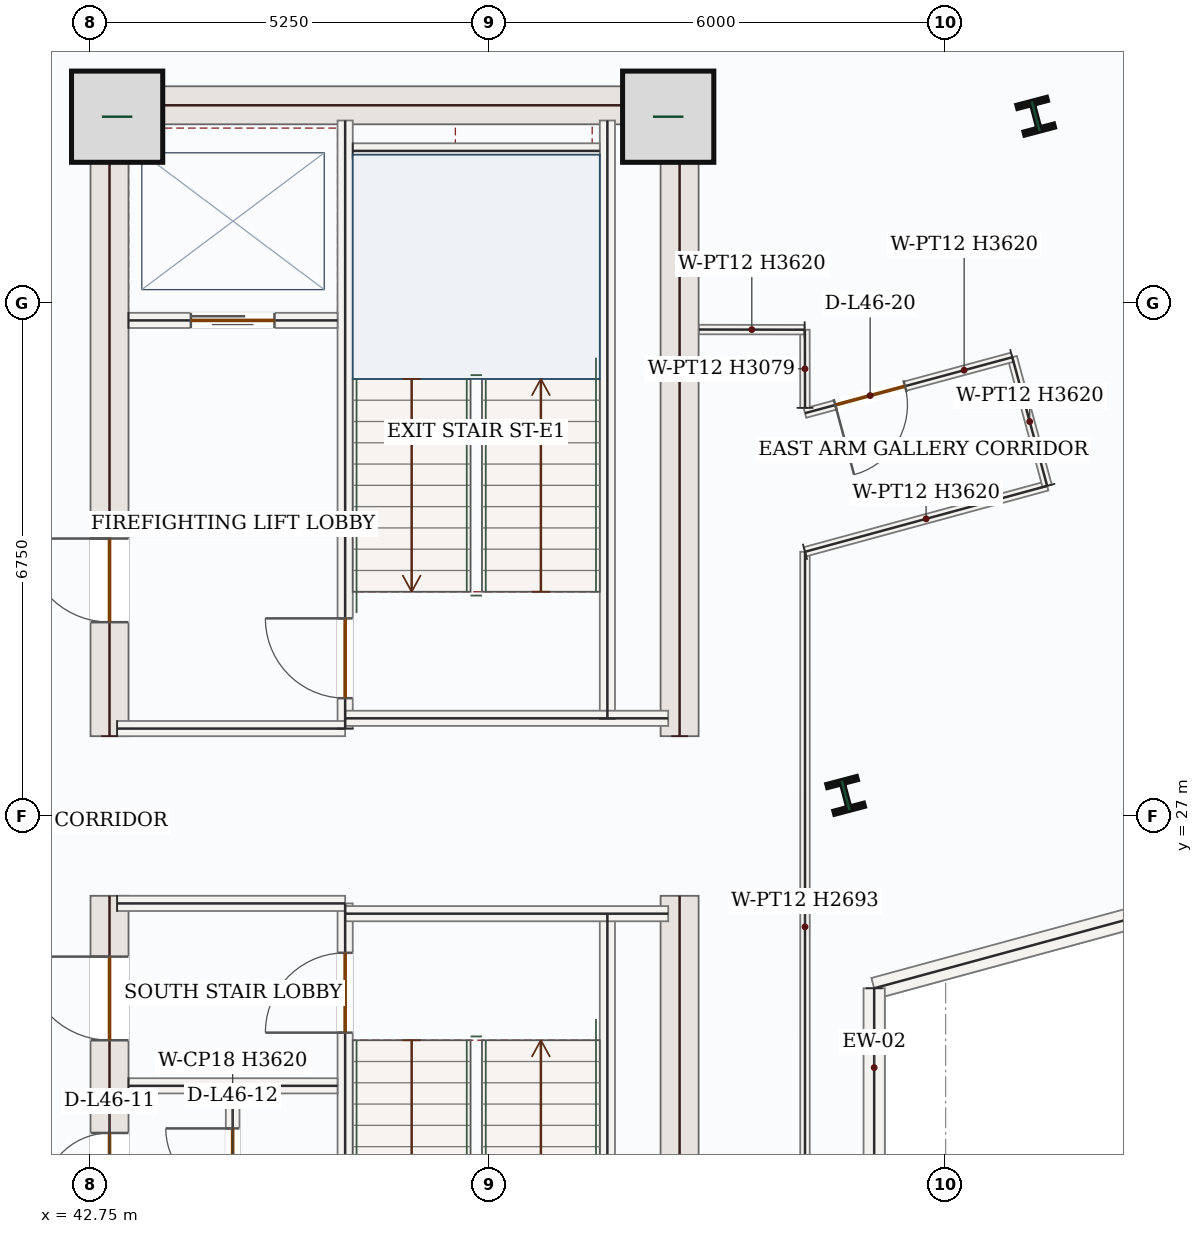
"""IFC4 building model, lengths in metres.
Left out: names, types, materials, properties, quantities, classifications, styles, units other than length and angle.
Written with IfcOpenShell. Run it as: python <this file> out.ifc"""

import sys

from ifc_helpers import new_model, si_unit, direction, frame, frame_2d, origin, origin_2d, place, context, subcontext, project, spatial, rectangle, i_section, extrude, source, transform, mapped, element, fill, save


model = new_model("IFC4")
c1 = context("Model", 3, precision=1e-05, world=origin(), true_north=direction((0.0, 1.0)))
c2 = subcontext(c1, "Body", "Model", "MODEL_VIEW")
j1 = project(units=[si_unit("LENGTHUNIT", "METRE"), si_unit("PLANEANGLEUNIT", "RADIAN")], contexts=[c1])
p1 = place(None, origin())
s1 = spatial("IfcSite", under=j1, at=p1, CompositionType="ELEMENT")
p2 = place(p1, origin())
s2 = spatial("IfcBuilding", under=s1, at=p2, CompositionType="ELEMENT")
p3 = place(p2, frame((0.0, 0.0, 198.0)))
s3 = spatial("IfcBuildingStorey", under=s2, at=p3, CompositionType="ELEMENT", Elevation=198.0)
p4 = place(p3, frame((43.0, 17.4, 0.0), z_axis=(0.0, 0.0, 1.0), x_axis=(0.0, 1.0, 0.0)))
e1 = element("IfcWall", 1, at=p4, inside=s3, PredefinedType="SHEAR", context=c2, shape_type="SweptSolid", body=[
    extrude(rectangle(XDim=8.55, YDim=0.5, at=frame_2d((4.275, 0.0))), origin(), (0.0, 0.0, 1.0), 3.62),
])
p5 = place(p4, frame((6.65, 0.0, 0.0)))
e2 = element("IfcOpeningElement", 2, at=p5, cuts=e1, PredefinedType="OPENING", context=c2, shape_type="SweptSolid", body=[
    extrude(rectangle(XDim=1.1, YDim=2.2, at=frame_2d((0.55, 1.1))), frame((0.0, 0.26, 0.0), z_axis=(0.0, -1.0, 0.0), x_axis=(1.0, 0.0, 0.0)), (0.0, 0.0, 1.0), 0.52),
])
p6 = place(p4, frame((1.75, 0.0, 0.0)))
e3 = element("IfcOpeningElement", 3, at=p6, cuts=e1, PredefinedType="OPENING", context=c2, shape_type="SweptSolid", body=[
    extrude(rectangle(XDim=1.3, YDim=2.2, at=frame_2d((0.65, 1.1))), frame((0.0, 0.26, 0.0), z_axis=(0.0, -1.0, 0.0), x_axis=(1.0, 0.0, 0.0)), (0.0, 0.0, 1.0), 0.52),
])
p7 = place(p4, frame((4.55, 0.0, 0.0)))
e4 = element("IfcOpeningElement", 4, at=p7, cuts=e1, PredefinedType="OPENING", context=c2, shape_type="SweptSolid", body=[
    extrude(rectangle(XDim=0.88, YDim=2.1, at=frame_2d((0.44, 1.05))), frame((0.0, 0.26, 0.0), z_axis=(0.0, -1.0, 0.0), x_axis=(1.0, 0.0, 0.0)), (0.0, 0.0, 1.0), 0.52),
])
p8 = place(p3, frame((43.0, 28.05, 0.0), z_axis=(0.0, 0.0, 1.0), x_axis=(0.0, 1.0, 0.0)))
e5 = element("IfcWall", 5, at=p8, inside=s3, PredefinedType="SHEAR", context=c2, shape_type="SweptSolid", body=[
    extrude(rectangle(XDim=8.55, YDim=0.5, at=frame_2d((4.275, 0.0))), origin(), (0.0, 0.0, 1.0), 3.62),
])
p9 = place(p8, frame((1.5, 0.0, 0.0)))
e6 = element("IfcOpeningElement", 6, at=p9, cuts=e5, PredefinedType="OPENING", context=c2, shape_type="SweptSolid", body=[
    extrude(rectangle(XDim=1.1, YDim=2.2, at=frame_2d((0.55, 1.1))), frame((0.0, 0.26, 0.0), z_axis=(0.0, -1.0, 0.0), x_axis=(1.0, 0.0, 0.0)), (0.0, 0.0, 1.0), 0.52),
])
m1 = source(origin(), c2, "Body", "SweptSolid", [
    extrude(rectangle(XDim=8.55, YDim=0.5, at=frame_2d((4.275, 0.0))), origin(), (0.0, 0.0, 1.0), 3.62),
])
for number, where, z_axis, x_axis in (
    (7, (50.5, 17.4, 0.0), (0.0, 0.0, 1.0), (0.0, 1.0, 0.0)),
    (8, (50.5, 28.05, 0.0), (0.0, 0.0, 1.0), (0.0, 1.0, 0.0)),
):
    element("IfcWall", number, at=place(p3, frame(where, z_axis=z_axis, x_axis=x_axis)), inside=s3, PredefinedType="SHEAR", context=c2, shape_type="MappedRepresentation", body=[
        mapped(m1, transform((0.0, 0.0, 0.0), x_axis=(1.0, 0.0, 0.0), y_axis=(0.0, 1.0, 0.0), z_axis=(0.0, 0.0, 1.0), scale=1.0)),
    ])
m2 = source(origin(), c2, "Body", "SweptSolid", [
    extrude(rectangle(XDim=7.0, YDim=0.5, at=frame_2d((3.5, 0.0))), origin(), (0.0, 0.0, 1.0), 3.62),
])
p10 = place(p3, frame((43.25, 36.35, 0.0), z_axis=(0.0, 0.0, 1.0), x_axis=(1.0, 0.0, 0.0)))
e9 = element("IfcWall", 9, at=p10, inside=s3, PredefinedType="SHEAR", context=c2, shape_type="MappedRepresentation", body=[
    mapped(m2, transform((0.0, 0.0, 0.0), x_axis=(1.0, 0.0, 0.0), y_axis=(0.0, 1.0, 0.0), z_axis=(0.0, 0.0, 1.0), scale=1.0)),
])
m3 = source(origin(), c2, "Body", "SweptSolid", [
    extrude(rectangle(XDim=1.2, YDim=1.2, at=origin_2d()), origin(), (0.0, 0.0, 1.0), 3.9),
])
for number, where, z_axis, x_axis in (
    (10, (43.1, 36.2, 0.0), (0.0, 0.0, 1.0), (1.0, 0.0, 0.0)),
    (11, (50.35, 36.2, 0.0), (0.0, 0.0, 1.0), (1.0, 0.0, 0.0)),
):
    element("IfcColumn", number, at=place(p3, frame(where, z_axis=z_axis, x_axis=x_axis)), inside=s3, PredefinedType="COLUMN", context=c2, shape_type="MappedRepresentation", body=[
        mapped(m3, transform((0.0, 0.0, 0.0), x_axis=(1.0, 0.0, 0.0), y_axis=(0.0, 1.0, 0.0), z_axis=(0.0, 0.0, 1.0), scale=1.0)),
    ])
m4 = source(origin(), c2, "Body", "SweptSolid", [
    extrude(i_section(OverallWidth=0.404, OverallDepth=0.407, WebThickness=0.027, FlangeThickness=0.044, FilletRadius=0.018, at=origin_2d()), origin(), (0.0, 0.0, 1.0), 3.9),
])
for number, where, z_axis, x_axis in (
    (12, (52.684, 27.271, 0.0), (0.0, 0.0, 1.0), (0.967, 0.255, 0.0)),
    (13, (55.185, 36.206, 0.0), (0.0, 0.0, 1.0), (0.967, 0.255, 0.0)),
):
    element("IfcColumn", number, at=place(p3, frame(where, z_axis=z_axis, x_axis=x_axis)), inside=s3, PredefinedType="COLUMN", context=c2, shape_type="MappedRepresentation", body=[
        mapped(m4, transform((0.0, 0.0, 0.0), x_axis=(1.0, 0.0, 0.0), y_axis=(0.0, 1.0, 0.0), z_axis=(0.0, 0.0, 1.0), scale=1.0)),
    ])
p11 = place(p3, frame((62.026, 27.17, 0.0), z_axis=(0.0, 0.0, 1.0), x_axis=(-0.965014433153, -0.262196765439, 0.0)))
e14 = element("IfcWall", 14, at=p11, inside=s3, PredefinedType="SOLIDWALL", context=c2, shape_type="SweptSolid", body=[
    extrude(rectangle(XDim=9.291, YDim=0.28, at=frame_2d((4.646, 0.0))), origin(), (0.0, 0.0, 1.0), 3.62),
])
p12 = place(p11, frame((3.746, 0.0, 0.85)))
e15 = element("IfcOpeningElement", 15, at=p12, cuts=e14, PredefinedType="OPENING", context=c2, shape_type="SweptSolid", body=[
    extrude(rectangle(XDim=1.8, YDim=1.75, at=frame_2d((0.9, 0.875))), frame((0.0, 0.15, 0.0), z_axis=(0.0, -1.0, 0.0), x_axis=(1.0, 0.0, 0.0)), (0.0, 0.0, 1.0), 0.3),
])
p13 = place(p3, frame((53.06, 24.734, 0.0), z_axis=(0.0, 0.0, 1.0), x_axis=(0.0, -1.0, 0.0)))
e16 = element("IfcWall", 16, at=p13, inside=s3, PredefinedType="SOLIDWALL", context=c2, shape_type="SweptSolid", body=[
    extrude(rectangle(XDim=6.276, YDim=0.28, at=frame_2d((3.138, 0.0))), origin(), (0.0, 0.0, 1.0), 3.62),
])
p14 = place(p13, frame((2.238, 0.0, 0.85)))
e17 = element("IfcOpeningElement", 17, at=p14, cuts=e16, PredefinedType="OPENING", context=c2, shape_type="SweptSolid", body=[
    extrude(rectangle(XDim=1.8, YDim=1.75, at=frame_2d((0.9, 0.875))), frame((0.0, 0.15, 0.0), z_axis=(0.0, -1.0, 0.0), x_axis=(1.0, 0.0, 0.0)), (0.0, 0.0, 1.0), 0.3),
])
m5 = source(origin(), c2, "Body", "SweptSolid", [
    extrude(rectangle(XDim=7.87, YDim=0.2, at=frame_2d((3.935, 0.0))), origin(), (0.0, 0.0, 1.0), 3.62),
])
for number, where, z_axis, x_axis in (
    (18, (49.55, 17.85, 0.0), (0.0, 0.0, 1.0), (0.0, 1.0, 0.0)),
    (19, (49.55, 28.28, 0.0), (0.0, 0.0, 1.0), (0.0, 1.0, 0.0)),
):
    element("IfcWall", number, at=place(p3, frame(where, z_axis=z_axis, x_axis=x_axis)), inside=s3, PredefinedType="SOLIDWALL", context=c2, shape_type="MappedRepresentation", body=[
        mapped(m5, transform((0.0, 0.0, 0.0), x_axis=(1.0, 0.0, 0.0), y_axis=(0.0, 1.0, 0.0), z_axis=(0.0, 0.0, 1.0), scale=1.0)),
    ])
p15 = place(p3, frame((46.1, 17.85, 0.0), z_axis=(0.0, 0.0, 1.0), x_axis=(0.0, 1.0, 0.0)))
e20 = element("IfcWall", 20, at=p15, inside=s3, PredefinedType="SOLIDWALL", context=c2, shape_type="SweptSolid", body=[
    extrude(rectangle(XDim=8.0, YDim=0.2, at=frame_2d((4.0, 0.0))), origin(), (0.0, 0.0, 1.0), 3.62),
])
p16 = place(p15, frame((6.3, 0.0, 0.0)))
e21 = element("IfcOpeningElement", 21, at=p16, cuts=e20, PredefinedType="OPENING", context=c2, shape_type="SweptSolid", body=[
    extrude(rectangle(XDim=1.05, YDim=2.15, at=frame_2d((0.525, 1.075))), frame((0.0, 0.11, 0.0), z_axis=(0.0, -1.0, 0.0), x_axis=(1.0, 0.0, 0.0)), (0.0, 0.0, 1.0), 0.22),
])
p17 = place(p3, frame((46.1, 28.15, 0.0), z_axis=(0.0, 0.0, 1.0), x_axis=(0.0, 1.0, 0.0)))
e22 = element("IfcWall", 22, at=p17, inside=s3, PredefinedType="SOLIDWALL", context=c2, shape_type="SweptSolid", body=[
    extrude(rectangle(XDim=8.0, YDim=0.2, at=frame_2d((4.0, 0.0))), origin(), (0.0, 0.0, 1.0), 3.62),
])
p18 = place(p17, frame((0.4, 0.0, 0.0)))
e23 = element("IfcOpeningElement", 23, at=p18, cuts=e22, PredefinedType="OPENING", context=c2, shape_type="SweptSolid", body=[
    extrude(rectangle(XDim=1.05, YDim=2.15, at=frame_2d((0.525, 1.075))), frame((0.0, 0.11, 0.0), z_axis=(0.0, -1.0, 0.0), x_axis=(1.0, 0.0, 0.0)), (0.0, 0.0, 1.0), 0.22),
])
m6 = source(origin(), c2, "Body", "SweptSolid", [
    extrude(rectangle(XDim=3.0, YDim=0.2, at=frame_2d((1.5, 0.0))), origin(), (0.0, 0.0, 1.0), 3.62),
])
p19 = place(p3, frame((43.1, 25.85, 0.0), z_axis=(0.0, 0.0, 1.0), x_axis=(1.0, 0.0, 0.0)))
e24 = element("IfcWall", 24, at=p19, inside=s3, PredefinedType="SOLIDWALL", context=c2, shape_type="MappedRepresentation", body=[
    mapped(m6, transform((0.0, 0.0, 0.0), x_axis=(1.0, 0.0, 0.0), y_axis=(0.0, 1.0, 0.0), z_axis=(0.0, 0.0, 1.0), scale=1.0)),
])
m7 = source(origin(), c2, "Body", "SweptSolid", [
    extrude(rectangle(XDim=4.25, YDim=0.2, at=frame_2d((2.125, 0.0))), origin(), (0.0, 0.0, 1.0), 3.62),
])
p20 = place(p3, frame((46.1, 25.715, 0.0), z_axis=(0.0, 0.0, 1.0), x_axis=(1.0, 0.0, 0.0)))
e25 = element("IfcWall", 25, at=p20, inside=s3, PredefinedType="SOLIDWALL", context=c2, shape_type="MappedRepresentation", body=[
    mapped(m7, transform((0.0, 0.0, 0.0), x_axis=(1.0, 0.0, 0.0), y_axis=(0.0, 1.0, 0.0), z_axis=(0.0, 0.0, 1.0), scale=1.0)),
])
p21 = place(p3, frame((43.1, 28.15, 0.0), z_axis=(0.0, 0.0, 1.0), x_axis=(1.0, 0.0, 0.0)))
e26 = element("IfcWall", 26, at=p21, inside=s3, PredefinedType="SOLIDWALL", context=c2, shape_type="MappedRepresentation", body=[
    mapped(m6, transform((0.0, 0.0, 0.0), x_axis=(1.0, 0.0, 0.0), y_axis=(0.0, 1.0, 0.0), z_axis=(0.0, 0.0, 1.0), scale=1.0)),
])
p22 = place(p3, frame((46.1, 28.285, 0.0), z_axis=(0.0, 0.0, 1.0), x_axis=(1.0, 0.0, 0.0)))
e27 = element("IfcWall", 27, at=p22, inside=s3, PredefinedType="SOLIDWALL", context=c2, shape_type="MappedRepresentation", body=[
    mapped(m7, transform((0.0, 0.0, 0.0), x_axis=(1.0, 0.0, 0.0), y_axis=(0.0, 1.0, 0.0), z_axis=(0.0, 0.0, 1.0), scale=1.0)),
])
m8 = source(origin(), c2, "Body", "SweptSolid", [
    extrude(rectangle(XDim=3.25, YDim=0.2, at=frame_2d((1.625, 0.0))), origin(), (0.0, 0.0, 1.0), 3.62),
])
p23 = place(p3, frame((46.2, 35.75, 0.0), z_axis=(0.0, 0.0, 1.0), x_axis=(1.0, 0.0, 0.0)))
e28 = element("IfcWall", 28, at=p23, inside=s3, PredefinedType="SOLIDWALL", context=c2, shape_type="MappedRepresentation", body=[
    mapped(m8, transform((0.0, 0.0, 0.0), x_axis=(1.0, 0.0, 0.0), y_axis=(0.0, 1.0, 0.0), z_axis=(0.0, 0.0, 1.0), scale=1.0)),
])
p24 = place(p3, frame((43.25, 33.52, 0.0), z_axis=(0.0, 0.0, 1.0), x_axis=(1.0, 0.0, 0.0)))
e29 = element("IfcWall", 29, at=p24, inside=s3, PredefinedType="SOLIDWALL", context=c2, shape_type="SweptSolid", body=[
    extrude(rectangle(XDim=2.75, YDim=0.2, at=frame_2d((1.375, 0.0))), origin(), (0.0, 0.0, 1.0), 3.62),
])
p25 = place(p24, frame((0.82, 0.0, 0.0)))
e30 = element("IfcOpeningElement", 30, at=p25, cuts=e29, PredefinedType="OPENING", context=c2, shape_type="SweptSolid", body=[
    extrude(rectangle(XDim=1.1, YDim=2.15, at=frame_2d((0.55, 1.075))), frame((0.0, 0.11, 0.0), z_axis=(0.0, -1.0, 0.0), x_axis=(1.0, 0.0, 0.0)), (0.0, 0.0, 1.0), 0.22),
])
m9 = source(origin(), c2, "Body", "SweptSolid", [
    extrude(rectangle(XDim=2.75, YDim=0.2, at=frame_2d((1.375, 0.0))), origin(), (0.0, 0.0, 1.0), 3.62),
])
p26 = place(p3, frame((43.25, 23.45, 0.0), z_axis=(0.0, 0.0, 1.0), x_axis=(1.0, 0.0, 0.0)))
e31 = element("IfcWall", 31, at=p26, inside=s3, PredefinedType="SOLIDWALL", context=c2, shape_type="MappedRepresentation", body=[
    mapped(m9, transform((0.0, 0.0, 0.0), x_axis=(1.0, 0.0, 0.0), y_axis=(0.0, 1.0, 0.0), z_axis=(0.0, 0.0, 1.0), scale=1.0)),
])
p27 = place(p3, frame((44.62, 21.55, 0.0), z_axis=(0.0, 0.0, 1.0), x_axis=(0.0, 1.0, 0.0)))
e32 = element("IfcWall", 32, at=p27, inside=s3, PredefinedType="PARTITIONING", context=c2, shape_type="SweptSolid", body=[
    extrude(rectangle(XDim=1.8, YDim=0.18, at=frame_2d((0.9, 0.0))), origin(), (0.0, 0.0, 1.0), 3.62),
])
p28 = place(p27, frame((0.46, 0.0, 0.0)))
e33 = element("IfcOpeningElement", 33, at=p28, cuts=e32, PredefinedType="OPENING", context=c2, shape_type="SweptSolid", body=[
    extrude(rectangle(XDim=0.88, YDim=2.1, at=frame_2d((0.44, 1.05))), frame((0.0, 0.1, 0.0), z_axis=(0.0, -1.0, 0.0), x_axis=(1.0, 0.0, 0.0)), (0.0, 0.0, 1.0), 0.2),
])
m10 = source(origin(), c2, "Body", "SweptSolid", [
    extrude(rectangle(XDim=9.868, YDim=0.125, at=frame_2d((4.934, 0.0))), origin(), (0.0, 0.0, 1.0), 2.693),
])
p29 = place(p3, frame((52.15, 20.608, 0.0), z_axis=(0.0, 0.0, 1.0), x_axis=(2.4739616e-05, 0.999999999694, 0.0)))
e34 = element("IfcWall", 34, at=p29, inside=s3, PredefinedType="PARTITIONING", context=c2, shape_type="MappedRepresentation", body=[
    mapped(m10, transform((0.0, 0.0, 0.0), x_axis=(1.0, 0.0, 0.0), y_axis=(0.0, 1.0, 0.0), z_axis=(0.0, 0.0, 1.0), scale=1.0)),
])
m11 = source(origin(), c2, "Body", "SweptSolid", [
    extrude(rectangle(XDim=3.301, YDim=0.125, at=frame_2d((1.65, 0.0))), origin(), (0.0, 0.0, 1.0), 3.62),
])
p30 = place(p3, frame((52.15, 30.476, 0.0), z_axis=(0.0, 0.0, 1.0), x_axis=(0.964918963187, 0.262547889884, 0.0)))
e35 = element("IfcWall", 35, at=p30, inside=s3, PredefinedType="PARTITIONING", context=c2, shape_type="MappedRepresentation", body=[
    mapped(m11, transform((0.0, 0.0, 0.0), x_axis=(1.0, 0.0, 0.0), y_axis=(0.0, 1.0, 0.0), z_axis=(0.0, 0.0, 1.0), scale=1.0)),
])
m12 = source(origin(), c2, "Body", "SweptSolid", [
    extrude(rectangle(XDim=1.754, YDim=0.125, at=frame_2d((0.877, 0.0))), origin(), (0.0, 0.0, 1.0), 3.62),
])
p31 = place(p3, frame((55.335, 31.343, 0.0), z_axis=(0.0, 0.0, 1.0), x_axis=(-0.261585705111, 0.965180252016, 0.0)))
e36 = element("IfcWall", 36, at=p31, inside=s3, PredefinedType="PARTITIONING", context=c2, shape_type="MappedRepresentation", body=[
    mapped(m12, transform((0.0, 0.0, 0.0), x_axis=(1.0, 0.0, 0.0), y_axis=(0.0, 1.0, 0.0), z_axis=(0.0, 0.0, 1.0), scale=1.0)),
])
p32 = place(p3, frame((54.877, 33.035, 0.0), z_axis=(0.0, 0.0, 1.0), x_axis=(-0.965486271956, -0.260453947301, 0.0)))
e37 = element("IfcWall", 37, at=p32, inside=s3, PredefinedType="PARTITIONING", context=c2, shape_type="SweptSolid", body=[
    extrude(rectangle(XDim=2.824, YDim=0.125, at=frame_2d((1.412, 0.0))), origin(), (0.0, 0.0, 1.0), 3.62),
])
p33 = place(p32, frame((1.462, 0.0, 0.0)))
e38 = element("IfcOpeningElement", 38, at=p33, cuts=e37, PredefinedType="OPENING", context=c2, shape_type="SweptSolid", body=[
    extrude(rectangle(XDim=0.95, YDim=2.15, at=frame_2d((0.475, 1.075))), frame((0.0, 0.073, 0.0), z_axis=(0.0, -1.0, 0.0), x_axis=(1.0, 0.0, 0.0)), (0.0, 0.0, 1.0), 0.145),
])
m13 = source(origin(), c2, "Body", "SweptSolid", [
    extrude(rectangle(XDim=1.028, YDim=0.125, at=frame_2d((0.514, 0.0))), origin(), (0.0, 0.0, 1.0), 3.079),
])
p34 = place(p3, frame((52.15, 32.37, 0.0), z_axis=(0.0, 0.0, 1.0), x_axis=(-0.001187365584, 0.999999295081, 0.0)))
e39 = element("IfcWall", 39, at=p34, inside=s3, PredefinedType="PARTITIONING", context=c2, shape_type="MappedRepresentation", body=[
    mapped(m13, transform((0.0, 0.0, 0.0), x_axis=(1.0, 0.0, 0.0), y_axis=(0.0, 1.0, 0.0), z_axis=(0.0, 0.0, 1.0), scale=1.0)),
])
m14 = source(origin(), c2, "Body", "SweptSolid", [
    extrude(rectangle(XDim=1.39, YDim=0.125, at=frame_2d((0.695, 0.0))), origin(), (0.0, 0.0, 1.0), 3.62),
])
p35 = place(p3, frame((52.145, 33.398, 0.0), z_axis=(0.0, 0.0, 1.0), x_axis=(-0.999998750398, 0.001580886835, 0.0)))
e40 = element("IfcWall", 40, at=p35, inside=s3, PredefinedType="PARTITIONING", context=c2, shape_type="MappedRepresentation", body=[
    mapped(m14, transform((0.0, 0.0, 0.0), x_axis=(1.0, 0.0, 0.0), y_axis=(0.0, 1.0, 0.0), z_axis=(0.0, 0.0, 1.0), scale=1.0)),
])
m15 = source(origin(), c2, "Body", "SweptSolid", [
    extrude(rectangle(XDim=1.05, YDim=2.15, at=frame_2d((0.525, 1.075))), frame((0.0, 0.025, 0.0), z_axis=(0.0, -1.0, 0.0), x_axis=(1.0, 0.0, 0.0)), (0.0, 0.0, 1.0), 0.05),
])
p36 = place(p18, origin())
e41 = element("IfcDoor", 41, at=p36, inside=s3, OperationType="SINGLE_SWING_RIGHT", PredefinedType="DOOR", context=c2, shape_type="MappedRepresentation", body=[
    mapped(m15, transform((0.0, 0.0, 0.0), x_axis=(1.0, 0.0, 0.0), y_axis=(0.0, 1.0, 0.0), z_axis=(0.0, 0.0, 1.0), scale=1.0)),
])
fill(e23, e41)
p37 = place(p16, origin())
e42 = element("IfcDoor", 42, at=p37, inside=s3, OperationType="SINGLE_SWING_LEFT", PredefinedType="DOOR", context=c2, shape_type="MappedRepresentation", body=[
    mapped(m15, transform((0.0, 0.0, 0.0), x_axis=(1.0, 0.0, 0.0), y_axis=(0.0, 1.0, 0.0), z_axis=(0.0, 0.0, 1.0), scale=1.0)),
])
fill(e21, e42)
m16 = source(origin(), c2, "Body", "SweptSolid", [
    extrude(rectangle(XDim=1.1, YDim=2.15, at=frame_2d((0.55, 1.075))), frame((0.0, 0.025, 0.0), z_axis=(0.0, -1.0, 0.0), x_axis=(1.0, 0.0, 0.0)), (0.0, 0.0, 1.0), 0.05),
])
p38 = place(p25, origin())
e43 = element("IfcDoor", 43, at=p38, inside=s3, OperationType="DOUBLE_DOOR_SLIDING", PredefinedType="DOOR", context=c2, shape_type="MappedRepresentation", body=[
    mapped(m16, transform((0.0, 0.0, 0.0), x_axis=(1.0, 0.0, 0.0), y_axis=(0.0, 1.0, 0.0), z_axis=(0.0, 0.0, 1.0), scale=1.0)),
])
fill(e30, e43)
m17 = source(origin(), c2, "Body", "SweptSolid", [
    extrude(rectangle(XDim=1.1, YDim=2.2, at=frame_2d((0.55, 1.1))), frame((0.0, 0.025, 0.0), z_axis=(0.0, -1.0, 0.0), x_axis=(1.0, 0.0, 0.0)), (0.0, 0.0, 1.0), 0.05),
])
p39 = place(p9, origin())
e44 = element("IfcDoor", 44, at=p39, inside=s3, OperationType="SINGLE_SWING_RIGHT", PredefinedType="DOOR", context=c2, shape_type="MappedRepresentation", body=[
    mapped(m17, transform((0.0, 0.0, 0.0), x_axis=(1.0, 0.0, 0.0), y_axis=(0.0, 1.0, 0.0), z_axis=(0.0, 0.0, 1.0), scale=1.0)),
])
fill(e6, e44)
p40 = place(p5, origin())
e45 = element("IfcDoor", 45, at=p40, inside=s3, OperationType="SINGLE_SWING_RIGHT", PredefinedType="DOOR", context=c2, shape_type="MappedRepresentation", body=[
    mapped(m17, transform((0.0, 0.0, 0.0), x_axis=(1.0, 0.0, 0.0), y_axis=(0.0, 1.0, 0.0), z_axis=(0.0, 0.0, 1.0), scale=1.0)),
])
fill(e2, e45)
m18 = source(origin(), c2, "Body", "SweptSolid", [
    extrude(rectangle(XDim=0.88, YDim=2.1, at=frame_2d((0.44, 1.05))), frame((0.0, 0.025, 0.0), z_axis=(0.0, -1.0, 0.0), x_axis=(1.0, 0.0, 0.0)), (0.0, 0.0, 1.0), 0.05),
])
p41 = place(p7, origin())
e46 = element("IfcDoor", 46, at=p41, inside=s3, OperationType="SINGLE_SWING_LEFT", PredefinedType="DOOR", context=c2, shape_type="MappedRepresentation", body=[
    mapped(m18, transform((0.0, 0.0, 0.0), x_axis=(1.0, 0.0, 0.0), y_axis=(0.0, 1.0, 0.0), z_axis=(0.0, 0.0, 1.0), scale=1.0)),
])
fill(e4, e46)
p42 = place(p28, origin())
e47 = element("IfcDoor", 47, at=p42, inside=s3, OperationType="SINGLE_SWING_RIGHT", PredefinedType="DOOR", context=c2, shape_type="MappedRepresentation", body=[
    mapped(m18, transform((0.0, 0.0, 0.0), x_axis=(1.0, 0.0, 0.0), y_axis=(0.0, 1.0, 0.0), z_axis=(0.0, 0.0, 1.0), scale=1.0)),
])
fill(e33, e47)
m19 = source(origin(), c2, "Body", "SweptSolid", [
    extrude(rectangle(XDim=0.95, YDim=2.15, at=frame_2d((0.475, 1.075))), frame((0.0, 0.025, 0.0), z_axis=(0.0, -1.0, 0.0), x_axis=(1.0, 0.0, 0.0)), (0.0, 0.0, 1.0), 0.05),
])
p43 = place(p33, origin())
e48 = element("IfcDoor", 48, at=p43, inside=s3, OperationType="SINGLE_SWING_RIGHT", PredefinedType="DOOR", context=c2, shape_type="MappedRepresentation", body=[
    mapped(m19, transform((0.0, 0.0, 0.0), x_axis=(1.0, 0.0, 0.0), y_axis=(0.0, 1.0, 0.0), z_axis=(0.0, 0.0, 1.0), scale=1.0)),
])
fill(e38, e48)
save(model, sys.argv[1])
